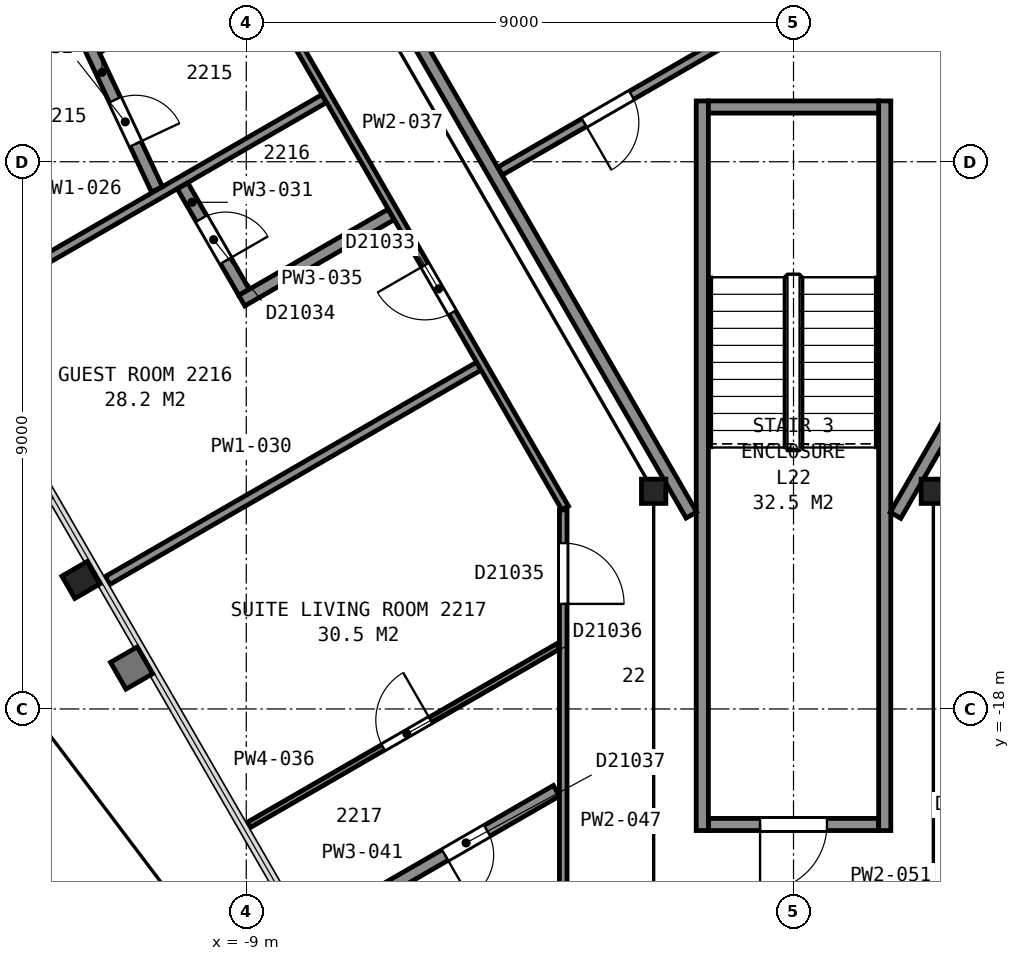
"""IFC4 building model, lengths in metres.
Left out: names, types, materials, properties, quantities, classifications, styles, units other than length and angle.
Written with IfcOpenShell. Run it as: python <this file> out.ifc"""

import sys

from ifc_helpers import new_model, si_unit, direction, frame, frame_2d, origin, origin_2d, place, context, subcontext, project, spatial, rectangle, i_section, extrude, element, fill, save


model = new_model("IFC4")
c1 = context("Model", 3, precision=1e-05, world=origin(), true_north=direction((0.0, 1.0)))
c2 = subcontext(c1, "Body", "Model", "MODEL_VIEW")
j1 = project(units=[si_unit("LENGTHUNIT", "METRE"), si_unit("PLANEANGLEUNIT", "RADIAN")], contexts=[c1])
p1 = place(None, origin())
s1 = spatial("IfcSite", under=j1, at=p1, CompositionType="ELEMENT")
p2 = place(p1, origin())
s2 = spatial("IfcBuilding", under=s1, at=p2, CompositionType="ELEMENT")
p3 = place(p2, frame((0.0, 0.0, 96.4)))
s3 = spatial("IfcBuildingStorey", under=s2, at=p3, CompositionType="ELEMENT", Elevation=96.4)
p4 = place(p3, frame((-11.72, -15.88, 0.0), z_axis=(0.0, 0.0, 1.0), x_axis=(-0.5, 0.866025403784, 0.0)))
e1 = element("IfcColumn", 1, at=p4, inside=s3, PredefinedType="COLUMN", context=c2, shape_type="SweptSolid", body=[
    extrude(i_section(OverallWidth=0.424, OverallDepth=0.475, WebThickness=0.048, FlangeThickness=0.077, FilletRadius=0.015, at=origin_2d()), origin(), (0.0, 0.0, 1.0), 3.56),
])
for number, where, z_axis, x_axis in (
    (2, (-2.3, -14.42, 0.0), (0.0, 0.0, 1.0), (1.0, 0.0, 0.0)),
    (3, (2.3, -14.42, 0.0), (0.0, 0.0, 1.0), (1.0, 0.0, 0.0)),
):
    element("IfcColumn", number, at=place(p3, frame(where, z_axis=z_axis, x_axis=x_axis)), inside=s3, PredefinedType="COLUMN", context=c2, shape_type="SweptSolid", body=[
        extrude(i_section(OverallWidth=0.401, OverallDepth=0.399, WebThickness=0.025, FlangeThickness=0.04, FilletRadius=0.015, at=origin_2d()), origin(), (0.0, 0.0, 1.0), 3.6),
    ])
p5 = place(p3, frame((-1.4, -19.9, 0.0), z_axis=(0.0, 0.0, 1.0), x_axis=(1.0, 0.0, 0.0)))
e4 = element("IfcWall", 4, at=p5, inside=s3, PredefinedType="PARTITIONING", context=c2, shape_type="SweptSolid", body=[
    extrude(rectangle(XDim=2.8, YDim=0.2, at=frame_2d((1.4, 0.0))), origin(), (0.0, 0.0, 1.0), 3.35),
])
p6 = place(p5, frame((0.85, 0.0, 0.0)))
e5 = element("IfcOpeningElement", 5, at=p6, cuts=e4, PredefinedType="OPENING", context=c2, shape_type="SweptSolid", body=[
    extrude(rectangle(XDim=1.1, YDim=2.1, at=frame_2d((0.55, 1.05))), frame((0.0, 0.11, 0.0), z_axis=(0.0, -1.0, 0.0), x_axis=(1.0, 0.0, 0.0)), (0.0, 0.0, 1.0), 0.22),
])
for number, where, z_axis, x_axis in (
    (6, (1.5, -8.0, 0.0), (0.0, 0.0, 1.0), (0.0, -1.0, 0.0)),
    (7, (-1.5, -8.0, 0.0), (0.0, 0.0, 1.0), (0.0, -1.0, 0.0)),
):
    element("IfcWall", number, at=place(p3, frame(where, z_axis=z_axis, x_axis=x_axis)), inside=s3, PredefinedType="PARTITIONING", context=c2, shape_type="SweptSolid", body=[
        extrude(rectangle(XDim=12.0, YDim=0.2, at=frame_2d((6.0, 0.0))), origin(), (0.0, 0.0, 1.0), 3.35),
    ])
p7 = place(p3, frame((-1.4, -8.1, 0.0), z_axis=(0.0, 0.0, 1.0), x_axis=(1.0, 0.0, 0.0)))
e8 = element("IfcWall", 8, at=p7, inside=s3, PredefinedType="PARTITIONING", context=c2, shape_type="SweptSolid", body=[
    extrude(rectangle(XDim=2.8, YDim=0.2, at=frame_2d((1.4, 0.0))), origin(), (0.0, 0.0, 1.0), 3.35),
])
p8 = place(p3, frame((-13.664, 5.946, 0.0), z_axis=(0.0, 0.0, 1.0), x_axis=(0.499994327219, -0.866028678941, 0.0)))
e9 = element("IfcWall", 9, at=p8, inside=s3, PredefinedType="PARTITIONING", context=c2, shape_type="SweptSolid", body=[
    extrude(rectangle(XDim=23.968, YDim=0.2, at=frame_2d((11.984, 0.0))), origin(), (0.0, 0.0, 1.0), 3.35),
])
p9 = place(p3, frame((-4.825, -9.154, 0.0), z_axis=(0.0, 0.0, 1.0), x_axis=(0.866023738697, 0.500002884005, 0.0)))
e10 = element("IfcWall", 10, at=p9, inside=s3, PredefinedType="PARTITIONING", context=c2, shape_type="SweptSolid", body=[
    extrude(rectangle(XDim=4.22, YDim=0.15, at=frame_2d((2.11, 0.0))), origin(), (0.0, 0.0, 1.0), 3.35),
])
p10 = place(p9, frame((1.595, 0.0, 0.0)))
e11 = element("IfcOpeningElement", 11, at=p10, cuts=e10, PredefinedType="OPENING", context=c2, shape_type="SweptSolid", body=[
    extrude(rectangle(XDim=0.9, YDim=2.1, at=frame_2d((0.45, 1.05))), frame((0.0, 0.085, 0.0), z_axis=(0.0, -1.0, 0.0), x_axis=(1.0, 0.0, 0.0)), (0.0, 0.0, 1.0), 0.17),
])
p11 = place(p3, frame((1.677, -14.815, 0.0), z_axis=(0.0, 0.0, 1.0), x_axis=(0.49999445743, 0.866028603765, 0.0)))
e12 = element("IfcWall", 12, at=p11, inside=s3, PredefinedType="PARTITIONING", context=c2, shape_type="SweptSolid", body=[
    extrude(rectangle(XDim=5.905, YDim=0.2, at=frame_2d((2.952, 0.0))), origin(), (0.0, 0.0, 1.0), 3.35),
])
p12 = place(p11, frame((3.855, 0.0, 0.0)))
e13 = element("IfcOpeningElement", 13, at=p12, cuts=e12, PredefinedType="OPENING", context=c2, shape_type="SweptSolid", body=[
    extrude(rectangle(XDim=1.8, YDim=2.1, at=frame_2d((0.9, 1.05))), frame((0.0, 0.11, 0.0), z_axis=(0.0, -1.0, 0.0), x_axis=(1.0, 0.0, 0.0)), (0.0, 0.0, 1.0), 0.22),
])
p13 = place(p3, frame((-10.037, -3.94, 0.0), z_axis=(0.0, 0.0, 1.0), x_axis=(-0.866063951978, -0.499933226626, 0.0)))
e14 = element("IfcWall", 14, at=p13, inside=s3, PredefinedType="PARTITIONING", context=c2, shape_type="SweptSolid", body=[
    extrude(rectangle(XDim=7.052, YDim=0.1, at=frame_2d((3.526, 0.0))), origin(), (0.0, 0.0, 1.0), 2.613),
])
p14 = place(p13, frame((2.998, 0.0, 0.0)))
e15 = element("IfcOpeningElement", 15, at=p14, cuts=e14, PredefinedType="OPENING", context=c2, shape_type="SweptSolid", body=[
    extrude(rectangle(XDim=0.9, YDim=2.1, at=frame_2d((0.45, 1.05))), frame((0.0, 0.06, 0.0), z_axis=(0.0, -1.0, 0.0), x_axis=(1.0, 0.0, 0.0)), (0.0, 0.0, 1.0), 0.12),
])
p15 = place(p3, frame((-13.823, -11.487, 0.0), z_axis=(0.0, 0.0, 1.0), x_axis=(0.865980767462, 0.500077304409, 0.0)))
e16 = element("IfcWall", 16, at=p15, inside=s3, PredefinedType="PARTITIONING", context=c2, shape_type="SweptSolid", body=[
    extrude(rectangle(XDim=7.047, YDim=0.15, at=frame_2d((3.524, 0.0))), origin(), (0.0, 0.0, 1.0), 2.613),
])
p16 = place(p3, frame((-11.585, -7.077, 0.0), z_axis=(0.0, 0.0, 1.0), x_axis=(0.425434257814, -0.904989332688, 0.0)))
e17 = element("IfcWall", 17, at=p16, inside=s3, PredefinedType="PARTITIONING", context=c2, shape_type="SweptSolid", body=[
    extrude(rectangle(XDim=2.625, YDim=0.2, at=frame_2d((1.313, 0.0))), origin(), (0.0, 0.0, 1.0), 2.613),
])
p17 = place(p16, frame((1.0, 0.0, 0.0)))
e18 = element("IfcOpeningElement", 18, at=p17, cuts=e17, PredefinedType="OPENING", context=c2, shape_type="SweptSolid", body=[
    extrude(rectangle(XDim=0.8, YDim=2.1, at=frame_2d((0.4, 1.05))), frame((0.0, 0.11, 0.0), z_axis=(0.0, -1.0, 0.0), x_axis=(1.0, 0.0, 0.0)), (0.0, 0.0, 1.0), 0.22),
])
p18 = place(p3, frame((-11.282, -15.888, 0.0), z_axis=(0.0, 0.0, 1.0), x_axis=(0.866031654768, 0.499989172823, 0.0)))
e19 = element("IfcWall", 19, at=p18, inside=s3, PredefinedType="PARTITIONING", context=c2, shape_type="SweptSolid", body=[
    extrude(rectangle(XDim=7.052, YDim=0.15, at=frame_2d((3.526, 0.0))), origin(), (0.0, 0.0, 1.0), 2.613),
])
p19 = place(p3, frame((-10.047, -9.398, 0.0), z_axis=(0.0, 0.0, 1.0), x_axis=(0.499935208997, -0.866062807656, 0.0)))
e20 = element("IfcWall", 20, at=p19, inside=s3, PredefinedType="PARTITIONING", context=c2, shape_type="SweptSolid", body=[
    extrude(rectangle(XDim=2.02, YDim=0.2, at=frame_2d((1.01, 0.0))), origin(), (0.0, 0.0, 1.0), 2.613),
])
p20 = place(p19, frame((0.62, 0.0, 0.0)))
e21 = element("IfcOpeningElement", 21, at=p20, cuts=e20, PredefinedType="OPENING", context=c2, shape_type="SweptSolid", body=[
    extrude(rectangle(XDim=0.8, YDim=2.1, at=frame_2d((0.4, 1.05))), frame((0.0, 0.11, 0.0), z_axis=(0.0, -1.0, 0.0), x_axis=(1.0, 0.0, 0.0)), (0.0, 0.0, 1.0), 0.22),
])
p21 = place(p3, frame((-9.074, -11.284, 0.0), z_axis=(0.0, 0.0, 1.0), x_axis=(0.866197046655, 0.499702587912, 0.0)))
e22 = element("IfcWall", 22, at=p21, inside=s3, PredefinedType="PARTITIONING", context=c2, shape_type="SweptSolid", body=[
    extrude(rectangle(XDim=2.837, YDim=0.2, at=frame_2d((1.418, 0.0))), origin(), (0.0, 0.0, 1.0), 2.613),
])
p22 = place(p3, frame((-3.875, -16.972, 0.0), z_axis=(0.0, 0.0, 1.0), x_axis=(-0.86602429061, -0.500001928069, 0.0)))
e23 = element("IfcWall", 23, at=p22, inside=s3, PredefinedType="PARTITIONING", context=c2, shape_type="SweptSolid", body=[
    extrude(rectangle(XDim=5.873, YDim=0.1, at=frame_2d((2.937, 0.0))), origin(), (0.0, 0.0, 1.0), 2.613),
])
p23 = place(p22, frame((2.419, 0.0, 0.0)))
e24 = element("IfcOpeningElement", 24, at=p23, cuts=e23, PredefinedType="OPENING", context=c2, shape_type="SweptSolid", body=[
    extrude(rectangle(XDim=0.9, YDim=2.1, at=frame_2d((0.45, 1.05))), frame((0.0, 0.06, 0.0), z_axis=(0.0, -1.0, 0.0), x_axis=(1.0, 0.0, 0.0)), (0.0, 0.0, 1.0), 0.12),
])
p24 = place(p3, frame((-3.756, -14.694, 0.0), z_axis=(0.0, 0.0, 1.0), x_axis=(-0.500051472265, 0.865995684219, 0.0)))
e25 = element("IfcWall", 25, at=p24, inside=s3, PredefinedType="PARTITIONING", context=c2, shape_type="SweptSolid", body=[
    extrude(rectangle(XDim=10.02, YDim=0.125, at=frame_2d((5.01, 0.0))), origin(), (0.0, 0.0, 1.0), 2.613),
])
p25 = place(p24, frame((3.711, 0.0, 0.0)))
e26 = element("IfcOpeningElement", 26, at=p25, cuts=e25, PredefinedType="OPENING", context=c2, shape_type="SweptSolid", body=[
    extrude(rectangle(XDim=0.9, YDim=2.1, at=frame_2d((0.45, 1.05))), frame((0.0, 0.073, 0.0), z_axis=(0.0, -1.0, 0.0), x_axis=(1.0, 0.0, 0.0)), (0.0, 0.0, 1.0), 0.145),
])
p26 = place(p3, frame((-3.899, -19.345, 0.0), z_axis=(0.0, 0.0, 1.0), x_axis=(-0.865971488458, -0.500093372459, 0.0)))
e27 = element("IfcWall", 27, at=p26, inside=s3, PredefinedType="PARTITIONING", context=c2, shape_type="SweptSolid", body=[
    extrude(rectangle(XDim=3.665, YDim=0.2, at=frame_2d((1.833, 0.0))), origin(), (0.0, 0.0, 1.0), 2.613),
])
p27 = place(p26, frame((1.315, 0.0, 0.0)))
e28 = element("IfcOpeningElement", 28, at=p27, cuts=e27, PredefinedType="OPENING", context=c2, shape_type="SweptSolid", body=[
    extrude(rectangle(XDim=0.8, YDim=2.1, at=frame_2d((0.4, 1.05))), frame((0.0, 0.11, 0.0), z_axis=(0.0, -1.0, 0.0), x_axis=(1.0, 0.0, 0.0)), (0.0, 0.0, 1.0), 0.22),
])
p28 = place(p3, frame((-3.787, -22.85, 0.0), z_axis=(0.0, 0.0, 1.0), x_axis=(0.0, 1.0, 0.0)))
e29 = element("IfcWall", 29, at=p28, inside=s3, PredefinedType="PARTITIONING", context=c2, shape_type="SweptSolid", body=[
    extrude(rectangle(XDim=8.125, YDim=0.125, at=frame_2d((4.062, 0.0))), origin(), (0.0, 0.0, 1.0), 2.613),
])
p29 = place(p28, frame((6.577, 0.0, 0.0)))
e30 = element("IfcOpeningElement", 30, at=p29, cuts=e29, PredefinedType="OPENING", context=c2, shape_type="SweptSolid", body=[
    extrude(rectangle(XDim=1.0, YDim=2.1, at=frame_2d((0.5, 1.05))), frame((0.0, 0.073, 0.0), z_axis=(0.0, -1.0, 0.0), x_axis=(1.0, 0.0, 0.0)), (0.0, 0.0, 1.0), 0.145),
])
p30 = place(p6, origin())
e31 = element("IfcDoor", 31, at=p30, inside=s3, OperationType="SINGLE_SWING_LEFT", PredefinedType="DOOR", context=c2, shape_type="SweptSolid", body=[
    extrude(rectangle(XDim=1.1, YDim=2.1, at=frame_2d((0.55, 1.05))), frame((0.0, 0.025, 0.0), z_axis=(0.0, -1.0, 0.0), x_axis=(1.0, 0.0, 0.0)), (0.0, 0.0, 1.0), 0.05),
])
fill(e5, e31)
p31 = place(p10, origin())
e32 = element("IfcDoor", 32, at=p31, inside=s3, OperationType="SINGLE_SWING_LEFT", PredefinedType="DOOR", context=c2, shape_type="SweptSolid", body=[
    extrude(rectangle(XDim=0.9, YDim=2.1, at=frame_2d((0.45, 1.05))), frame((0.0, 0.025, 0.0), z_axis=(0.0, -1.0, 0.0), x_axis=(1.0, 0.0, 0.0)), (0.0, 0.0, 1.0), 0.05),
])
fill(e11, e32)
p32 = place(p17, origin())
e33 = element("IfcDoor", 33, at=p32, inside=s3, OperationType="SINGLE_SWING_RIGHT", PredefinedType="DOOR", context=c2, shape_type="SweptSolid", body=[
    extrude(rectangle(XDim=0.8, YDim=2.1, at=frame_2d((0.4, 1.05))), frame((0.0, 0.025, 0.0), z_axis=(0.0, -1.0, 0.0), x_axis=(1.0, 0.0, 0.0)), (0.0, 0.0, 1.0), 0.05),
])
fill(e18, e33)
p33 = place(p20, origin())
e34 = element("IfcDoor", 34, at=p33, inside=s3, OperationType="SINGLE_SWING_RIGHT", PredefinedType="DOOR", context=c2, shape_type="SweptSolid", body=[
    extrude(rectangle(XDim=0.8, YDim=2.1, at=frame_2d((0.4, 1.05))), frame((0.0, 0.025, 0.0), z_axis=(0.0, -1.0, 0.0), x_axis=(1.0, 0.0, 0.0)), (0.0, 0.0, 1.0), 0.05),
])
fill(e21, e34)
p34 = place(p23, origin())
e35 = element("IfcDoor", 35, at=p34, inside=s3, OperationType="SINGLE_SWING_LEFT", PredefinedType="DOOR", context=c2, shape_type="SweptSolid", body=[
    extrude(rectangle(XDim=0.9, YDim=2.1, at=frame_2d((0.45, 1.05))), frame((0.0, 0.025, 0.0), z_axis=(0.0, -1.0, 0.0), x_axis=(1.0, 0.0, 0.0)), (0.0, 0.0, 1.0), 0.05),
])
fill(e24, e35)
p35 = place(p25, origin())
e36 = element("IfcDoor", 36, at=p35, inside=s3, OperationType="SINGLE_SWING_RIGHT", PredefinedType="DOOR", context=c2, shape_type="SweptSolid", body=[
    extrude(rectangle(XDim=0.9, YDim=2.1, at=frame_2d((0.45, 1.05))), frame((0.0, 0.025, 0.0), z_axis=(0.0, -1.0, 0.0), x_axis=(1.0, 0.0, 0.0)), (0.0, 0.0, 1.0), 0.05),
])
fill(e26, e36)
p36 = place(p27, origin())
e37 = element("IfcDoor", 37, at=p36, inside=s3, OperationType="SINGLE_SWING_RIGHT", PredefinedType="DOOR", context=c2, shape_type="SweptSolid", body=[
    extrude(rectangle(XDim=0.8, YDim=2.1, at=frame_2d((0.4, 1.05))), frame((0.0, 0.025, 0.0), z_axis=(0.0, -1.0, 0.0), x_axis=(1.0, 0.0, 0.0)), (0.0, 0.0, 1.0), 0.05),
])
fill(e28, e37)
p37 = place(p29, origin())
e38 = element("IfcDoor", 38, at=p37, inside=s3, OperationType="SINGLE_SWING_LEFT", PredefinedType="DOOR", context=c2, shape_type="SweptSolid", body=[
    extrude(rectangle(XDim=1.0, YDim=2.1, at=frame_2d((0.5, 1.05))), frame((0.0, 0.025, 0.0), z_axis=(0.0, -1.0, 0.0), x_axis=(1.0, 0.0, 0.0)), (0.0, 0.0, 1.0), 0.05),
])
fill(e30, e38)
save(model, sys.argv[1])
